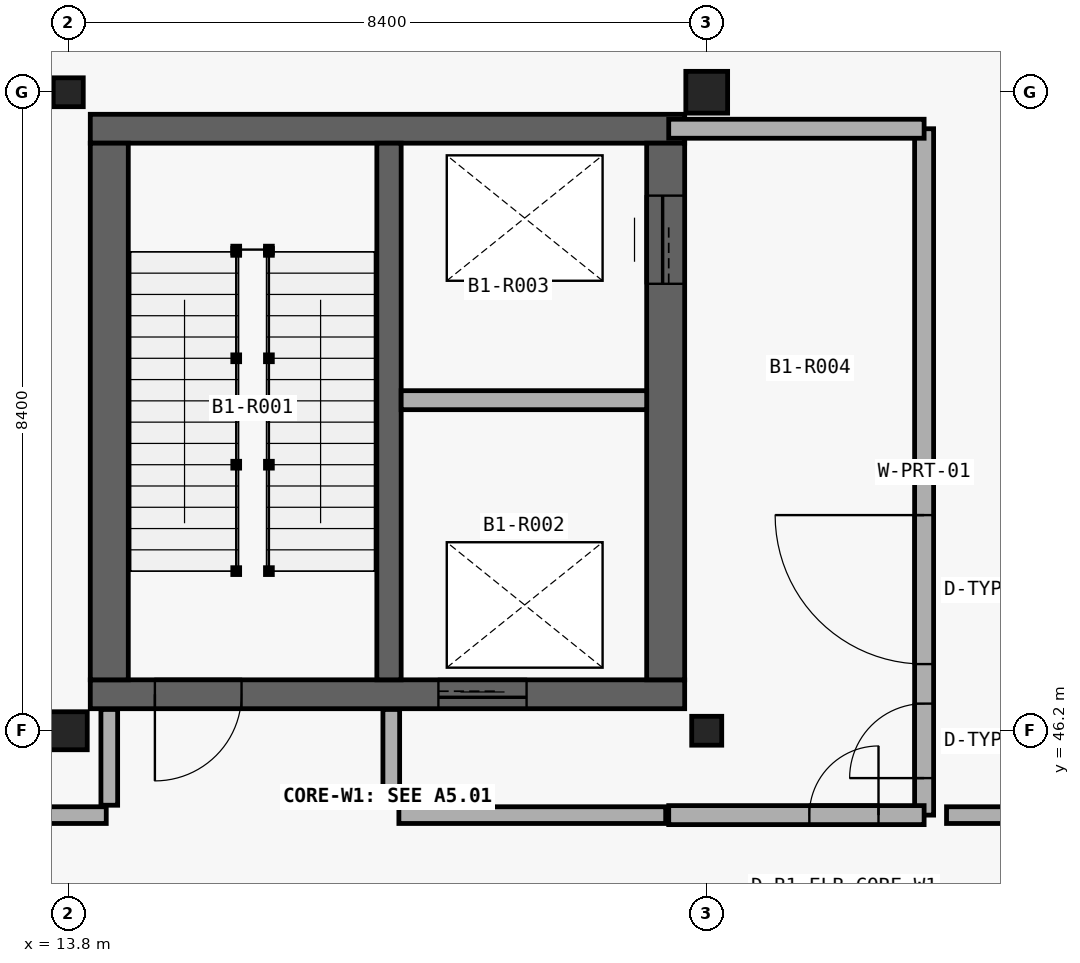
"""IFC4 building model, lengths in metres.
Left out: names, types, materials, properties, quantities, classifications, styles, units other than length and angle.
Written with IfcOpenShell. Run it as: python <this file> out.ifc"""

import sys

from ifc_helpers import new_model, si_unit, direction, frame, frame_2d, origin_with_axes, origin_2d_with_axis, place, context, subcontext, project, spatial, rectangle, i_section, extrude, element, fill, save


model = new_model("IFC4")
c1 = context("Model", 3, precision=1e-05, world=origin_with_axes(), true_north=direction((0.0, 1.0)))
c2 = subcontext(c1, "Body", "Model", "MODEL_VIEW")
j1 = project(units=[si_unit("LENGTHUNIT", "METRE"), si_unit("PLANEANGLEUNIT", "RADIAN")], contexts=[c1])
p1 = place(None, origin_with_axes())
s1 = spatial("IfcSite", under=j1, at=p1, CompositionType="ELEMENT")
p2 = place(p1, origin_with_axes())
s2 = spatial("IfcBuilding", under=s1, at=p2, CompositionType="ELEMENT")
p3 = place(p2, frame((0.0, 0.0, -4.8), z_axis=(0.0, 0.0, 1.0), x_axis=(1.0, 0.0, 0.0)))
s3 = spatial("IfcBuildingStorey", under=s2, at=p3, CompositionType="ELEMENT", Elevation=-4.8)
p4 = place(None, frame((14.09, 46.68, -5.35), z_axis=(0.0, 0.0, 1.0), x_axis=(1.0, 0.0, 0.0)))
e1 = element("IfcWall", 1, at=p4, inside=s3, PredefinedType="SHEAR", context=c2, shape_type="SweptSolid", body=[
    extrude(rectangle(XDim=7.82, YDim=0.38, at=frame_2d((3.91, 0.0), x_axis=(1.0, 0.0))), origin_with_axes(), (0.0, 0.0, 1.0), 5.35),
])
p5 = place(None, frame((15.51, 46.68, -4.8), z_axis=(0.0, 0.0, 1.0), x_axis=(1.0, 0.0, 0.0)))
e2 = element("IfcOpeningElement", 2, at=p5, cuts=e1, PredefinedType="OPENING", context=c2, shape_type="SweptSolid", body=[
    extrude(rectangle(XDim=1.14, YDim=2.18, at=frame_2d((0.0, 1.09), x_axis=(1.0, 0.0))), frame((0.0, 0.2, 0.0), z_axis=(0.0, -1.0, 0.0), x_axis=(1.0, 0.0, 0.0)), (0.0, 0.0, 1.0), 0.4),
])
p6 = place(None, frame((19.25, 46.68, -4.8), z_axis=(0.0, 0.0, 1.0), x_axis=(1.0, 0.0, 0.0)))
e3 = element("IfcOpeningElement", 3, at=p6, cuts=e1, PredefinedType="OPENING", context=c2, shape_type="SweptSolid", body=[
    extrude(rectangle(XDim=1.16, YDim=2.2, at=frame_2d((0.0, 1.1), x_axis=(1.0, 0.0))), frame((0.0, 0.2, 0.0), z_axis=(0.0, -1.0, 0.0), x_axis=(1.0, 0.0, 0.0)), (0.0, 0.0, 1.0), 0.4),
])
p7 = place(None, frame((21.91, 54.12, -5.35), z_axis=(0.0, 0.0, 1.0), x_axis=(-1.0, 0.0, 0.0)))
e4 = element("IfcWall", 4, at=p7, inside=s3, PredefinedType="SHEAR", context=c2, shape_type="SweptSolid", body=[
    extrude(rectangle(XDim=7.82, YDim=0.38, at=frame_2d((3.91, 0.0), x_axis=(1.0, 0.0))), origin_with_axes(), (0.0, 0.0, 1.0), 5.35),
])
p8 = place(None, frame((21.66, 46.87, -5.35), z_axis=(0.0, 0.0, 1.0), x_axis=(0.0, 1.0, 0.0)))
e5 = element("IfcWall", 5, at=p8, inside=s3, PredefinedType="SHEAR", context=c2, shape_type="SweptSolid", body=[
    extrude(rectangle(XDim=7.06, YDim=0.5, at=frame_2d((3.53, 0.0), x_axis=(1.0, 0.0))), origin_with_axes(), (0.0, 0.0, 1.0), 5.35),
])
p9 = place(None, frame((21.66, 52.66, -4.8), z_axis=(0.0, 0.0, 1.0), x_axis=(0.0, 1.0, 0.0)))
e6 = element("IfcOpeningElement", 6, at=p9, cuts=e5, PredefinedType="OPENING", context=c2, shape_type="SweptSolid", body=[
    extrude(rectangle(XDim=1.16, YDim=2.2, at=frame_2d((0.0, 1.1), x_axis=(1.0, 0.0))), frame((0.0, 0.26, 0.0), z_axis=(0.0, -1.0, 0.0), x_axis=(1.0, 0.0, 0.0)), (0.0, 0.0, 1.0), 0.52),
])
p10 = place(None, frame((14.34, 53.93, -5.35), z_axis=(0.0, 0.0, 1.0), x_axis=(0.0, -1.0, 0.0)))
e7 = element("IfcWall", 7, at=p10, inside=s3, PredefinedType="SHEAR", context=c2, shape_type="SweptSolid", body=[
    extrude(rectangle(XDim=7.06, YDim=0.5, at=frame_2d((3.53, 0.0), x_axis=(1.0, 0.0))), origin_with_axes(), (0.0, 0.0, 1.0), 5.35),
])
p11 = place(None, frame((18.02, 46.87, -5.35), z_axis=(0.0, 0.0, 1.0), x_axis=(0.0, 1.0, 0.0)))
e8 = element("IfcWall", 8, at=p11, inside=s3, PredefinedType="SHEAR", context=c2, shape_type="SweptSolid", body=[
    extrude(rectangle(XDim=7.06, YDim=0.32, at=frame_2d((3.53, 0.0), x_axis=(1.0, 0.0))), origin_with_axes(), (0.0, 0.0, 1.0), 5.35),
])
p12 = place(None, frame((18.18, 50.549, -4.8), z_axis=(0.0, 0.0, 1.0), x_axis=(1.0, 0.0, 0.0)))
e9 = element("IfcWall", 9, at=p12, inside=s3, PredefinedType="PARTITIONING", context=c2, shape_type="SweptSolid", body=[
    extrude(rectangle(XDim=3.23, YDim=0.25, at=frame_2d((1.615, 0.0), x_axis=(1.0, 0.0))), origin_with_axes(), (0.0, 0.0, 1.0), 4.44),
])
p13 = place(None, frame((25.06, 45.09, -4.8), z_axis=(0.0, 0.0, 1.0), x_axis=(0.0, 1.0, 0.0)))
e10 = element("IfcWall", 10, at=p13, inside=s3, PredefinedType="PARTITIONING", context=c2, shape_type="SweptSolid", body=[
    extrude(rectangle(XDim=9.03, YDim=0.25, at=frame_2d((4.515, 0.0), x_axis=(1.0, 0.0))), origin_with_axes(), (0.0, 0.0, 1.0), 4.44),
])
p14 = place(None, frame((25.06, 48.057, -4.8), z_axis=(0.0, 0.0, 1.0), x_axis=(0.0, 1.0, 0.0)))
e11 = element("IfcOpeningElement", 11, at=p14, cuts=e10, PredefinedType="OPENING", context=c2, shape_type="SweptSolid", body=[
    extrude(rectangle(XDim=1.96, YDim=2.46, at=frame_2d((0.0, 1.23), x_axis=(1.0, 0.0))), frame((0.0, 0.135, 0.0), z_axis=(0.0, -1.0, 0.0), x_axis=(1.0, 0.0, 0.0)), (0.0, 0.0, 1.0), 0.27),
])
p15 = place(None, frame((25.06, 46.067, -4.8), z_axis=(0.0, 0.0, 1.0), x_axis=(0.0, 1.0, 0.0)))
e12 = element("IfcOpeningElement", 12, at=p15, cuts=e10, PredefinedType="OPENING", context=c2, shape_type="SweptSolid", body=[
    extrude(rectangle(XDim=0.98, YDim=2.14, at=frame_2d((0.0, 1.07), x_axis=(1.0, 0.0))), frame((0.0, 0.135, 0.0), z_axis=(0.0, -1.0, 0.0), x_axis=(1.0, 0.0, 0.0)), (0.0, 0.0, 1.0), 0.27),
])
p16 = place(None, frame((21.7, 54.12, -4.8), z_axis=(0.0, 0.0, 1.0), x_axis=(1.0, 0.0, 0.0)))
e13 = element("IfcWall", 13, at=p16, inside=s3, PredefinedType="PARTITIONING", context=c2, shape_type="SweptSolid", body=[
    extrude(rectangle(XDim=3.36, YDim=0.25, at=frame_2d((1.68, 0.0), x_axis=(1.0, 0.0))), origin_with_axes(), (0.0, 0.0, 1.0), 4.44),
])
p17 = place(None, frame((21.7, 45.09, -4.8), z_axis=(0.0, 0.0, 1.0), x_axis=(1.0, 0.0, 0.0)))
e14 = element("IfcWall", 14, at=p17, inside=s3, PredefinedType="PARTITIONING", context=c2, shape_type="SweptSolid", body=[
    extrude(rectangle(XDim=3.36, YDim=0.25, at=frame_2d((1.68, 0.0), x_axis=(1.0, 0.0))), origin_with_axes(), (0.0, 0.0, 1.0), 4.44),
])
p18 = place(None, frame((24.005, 45.09, -4.8), z_axis=(0.0, 0.0, 1.0), x_axis=(1.0, 0.0, 0.0)))
e15 = element("IfcOpeningElement", 15, at=p18, cuts=e14, PredefinedType="OPENING", context=c2, shape_type="SweptSolid", body=[
    extrude(rectangle(XDim=0.91, YDim=2.12, at=frame_2d((0.0, 1.06), x_axis=(1.0, 0.0))), frame((0.0, 0.135, 0.0), z_axis=(0.0, -1.0, 0.0), x_axis=(1.0, 0.0, 0.0)), (0.0, 0.0, 1.0), 0.27),
])
for number, where, z_axis, x_axis in (
    (16, (14.34, 45.22, -4.8), (0.0, 0.0, 1.0), (0.0, 1.0, 0.0)),
    (17, (18.05, 45.22, -4.8), (0.0, 0.0, 1.0), (0.0, 1.0, 0.0)),
):
    element("IfcWall", number, at=place(None, frame(where, z_axis=z_axis, x_axis=x_axis)), inside=s3, PredefinedType="PARTITIONING", context=c2, shape_type="SweptSolid", body=[
        extrude(rectangle(XDim=1.26, YDim=0.22, at=frame_2d((0.63, 0.0), x_axis=(1.0, 0.0))), origin_with_axes(), (0.0, 0.0, 1.0), 4.44),
    ])
p19 = place(None, frame((6.22, 45.09, -4.8), z_axis=(0.0, 0.0, 1.0), x_axis=(1.0, 0.0, 0.0)))
e18 = element("IfcWall", 18, at=p19, inside=s3, PredefinedType="PARTITIONING", context=c2, shape_type="SweptSolid", body=[
    extrude(rectangle(XDim=8.08, YDim=0.22, at=frame_2d((4.04, 0.0), x_axis=(1.0, 0.0))), origin_with_axes(), (0.0, 0.0, 1.0), 4.44),
])
p20 = place(None, frame((10.26, 45.09, -4.8), z_axis=(0.0, 0.0, 1.0), x_axis=(1.0, 0.0, 0.0)))
e19 = element("IfcOpeningElement", 19, at=p20, cuts=e18, PredefinedType="OPENING", context=c2, shape_type="SweptSolid", body=[
    extrude(rectangle(XDim=1.68, YDim=2.22, at=frame_2d((0.0, 1.11), x_axis=(1.0, 0.0))), frame((0.0, 0.12, 0.0), z_axis=(0.0, -1.0, 0.0), x_axis=(1.0, 0.0, 0.0)), (0.0, 0.0, 1.0), 0.24),
])
p21 = place(None, frame((18.15, 45.09, -4.8), z_axis=(0.0, 0.0, 1.0), x_axis=(1.0, 0.0, 0.0)))
e20 = element("IfcWall", 20, at=p21, inside=s3, PredefinedType="PARTITIONING", context=c2, shape_type="SweptSolid", body=[
    extrude(rectangle(XDim=3.51, YDim=0.22, at=frame_2d((1.755, 0.0), x_axis=(1.0, 0.0))), origin_with_axes(), (0.0, 0.0, 1.0), 4.44),
])
p22 = place(None, frame((25.355, 45.09, -4.8), z_axis=(0.0, 0.0, 1.0), x_axis=(1.0, 0.0, 0.0)))
e21 = element("IfcWall", 21, at=p22, inside=s3, PredefinedType="PARTITIONING", context=c2, shape_type="SweptSolid", body=[
    extrude(rectangle(XDim=5.745, YDim=0.22, at=frame_2d((2.873, 0.0), x_axis=(1.0, 0.0))), origin_with_axes(), (0.0, 0.0, 1.0), 4.44),
])
p23 = place(None, frame((13.8, 46.2, -5.35), z_axis=(0.0, 0.0, 1.0), x_axis=(1.0, 0.0, 0.0)))
e22 = element("IfcColumn", 22, at=p23, inside=s3, PredefinedType="COLUMN", context=c2, shape_type="SweptSolid", body=[
    extrude(i_section(OverallWidth=0.5, OverallDepth=0.5, WebThickness=0.022, FlangeThickness=0.036, at=origin_2d_with_axis()), origin_with_axes(), (0.0, 0.0, 1.0), 5.35),
])
for number, where, z_axis, x_axis in (
    (23, (13.8, 54.6, -5.35), (0.0, 0.0, 1.0), (1.0, 0.0, 0.0)),
    (24, (22.2, 46.2, -5.35), (0.0, 0.0, 1.0), (1.0, 0.0, 0.0)),
):
    element("IfcColumn", number, at=place(None, frame(where, z_axis=z_axis, x_axis=x_axis)), inside=s3, PredefinedType="COLUMN", context=c2, shape_type="SweptSolid", body=[
        extrude(i_section(OverallWidth=0.395, OverallDepth=0.38, WebThickness=0.019, FlangeThickness=0.03, at=origin_2d_with_axis()), origin_with_axes(), (0.0, 0.0, 1.0), 5.35),
    ])
p24 = place(None, frame((22.2, 54.6, -5.35), z_axis=(0.0, 0.0, 1.0), x_axis=(1.0, 0.0, 0.0)))
e25 = element("IfcColumn", 25, at=p24, inside=s3, PredefinedType="COLUMN", context=c2, shape_type="SweptSolid", body=[
    extrude(i_section(OverallWidth=0.55, OverallDepth=0.55, WebThickness=0.025, FlangeThickness=0.042, at=origin_2d_with_axis()), origin_with_axes(), (0.0, 0.0, 1.0), 5.35),
])
p25 = place(None, frame((15.51, 46.68, -4.8), z_axis=(0.0, 0.0, 1.0), x_axis=(-1.0, 0.0, 0.0)))
e26 = element("IfcDoor", 26, at=p25, inside=s3, OperationType="SINGLE_SWING_LEFT", PredefinedType="DOOR", context=c2, shape_type="SweptSolid", body=[
    extrude(rectangle(XDim=1.14, YDim=2.18, at=frame_2d((0.0, 1.09), x_axis=(1.0, 0.0))), frame((0.0, 0.04, 0.0), z_axis=(0.0, -1.0, 0.0), x_axis=(1.0, 0.0, 0.0)), (0.0, 0.0, 1.0), 0.08),
])
fill(e2, e26)
p26 = place(None, frame((19.25, 46.68, -4.8), z_axis=(0.0, 0.0, 1.0), x_axis=(-1.0, 0.0, 0.0)))
e27 = element("IfcDoor", 27, at=p26, inside=s3, OperationType="SLIDING_TO_LEFT", PredefinedType="DOOR", context=c2, shape_type="SweptSolid", body=[
    extrude(rectangle(XDim=1.16, YDim=2.2, at=frame_2d((0.0, 1.1), x_axis=(1.0, 0.0))), frame((0.0, 0.04, 0.0), z_axis=(0.0, -1.0, 0.0), x_axis=(1.0, 0.0, 0.0)), (0.0, 0.0, 1.0), 0.08),
])
fill(e3, e27)
p27 = place(None, frame((21.66, 52.66, -4.8), z_axis=(0.0, 0.0, 1.0), x_axis=(0.0, 1.0, 0.0)))
e28 = element("IfcDoor", 28, at=p27, inside=s3, OperationType="SLIDING_TO_LEFT", PredefinedType="DOOR", context=c2, shape_type="SweptSolid", body=[
    extrude(rectangle(XDim=1.16, YDim=2.2, at=frame_2d((0.0, 1.1), x_axis=(1.0, 0.0))), frame((0.0, 0.04, 0.0), z_axis=(0.0, -1.0, 0.0), x_axis=(1.0, 0.0, 0.0)), (0.0, 0.0, 1.0), 0.08),
])
fill(e6, e28)
p28 = place(None, frame((24.005, 45.09, -4.8), z_axis=(0.0, 0.0, 1.0), x_axis=(1.0, 0.0, 0.0)))
e29 = element("IfcDoor", 29, at=p28, inside=s3, OperationType="SINGLE_SWING_RIGHT", PredefinedType="DOOR", context=c2, shape_type="SweptSolid", body=[
    extrude(rectangle(XDim=0.91, YDim=2.12, at=frame_2d((0.0, 1.06), x_axis=(1.0, 0.0))), frame((0.0, 0.04, 0.0), z_axis=(0.0, -1.0, 0.0), x_axis=(1.0, 0.0, 0.0)), (0.0, 0.0, 1.0), 0.08),
])
fill(e15, e29)
p29 = place(None, frame((25.06, 48.057, -4.8), z_axis=(0.0, 0.0, 1.0), x_axis=(0.0, 1.0, 0.0)))
e30 = element("IfcDoor", 30, at=p29, inside=s3, OperationType="SINGLE_SWING_RIGHT", PredefinedType="DOOR", context=c2, shape_type="SweptSolid", body=[
    extrude(rectangle(XDim=1.96, YDim=2.46, at=frame_2d((0.0, 1.23), x_axis=(1.0, 0.0))), frame((0.0, 0.04, 0.0), z_axis=(0.0, -1.0, 0.0), x_axis=(1.0, 0.0, 0.0)), (0.0, 0.0, 1.0), 0.08),
])
fill(e11, e30)
p30 = place(None, frame((25.06, 46.067, -4.8), z_axis=(0.0, 0.0, 1.0), x_axis=(0.0, 1.0, 0.0)))
e31 = element("IfcDoor", 31, at=p30, inside=s3, OperationType="SINGLE_SWING_LEFT", PredefinedType="DOOR", context=c2, shape_type="SweptSolid", body=[
    extrude(rectangle(XDim=0.98, YDim=2.14, at=frame_2d((0.0, 1.07), x_axis=(1.0, 0.0))), frame((0.0, 0.04, 0.0), z_axis=(0.0, -1.0, 0.0), x_axis=(1.0, 0.0, 0.0)), (0.0, 0.0, 1.0), 0.08),
])
fill(e12, e31)
save(model, sys.argv[1])
